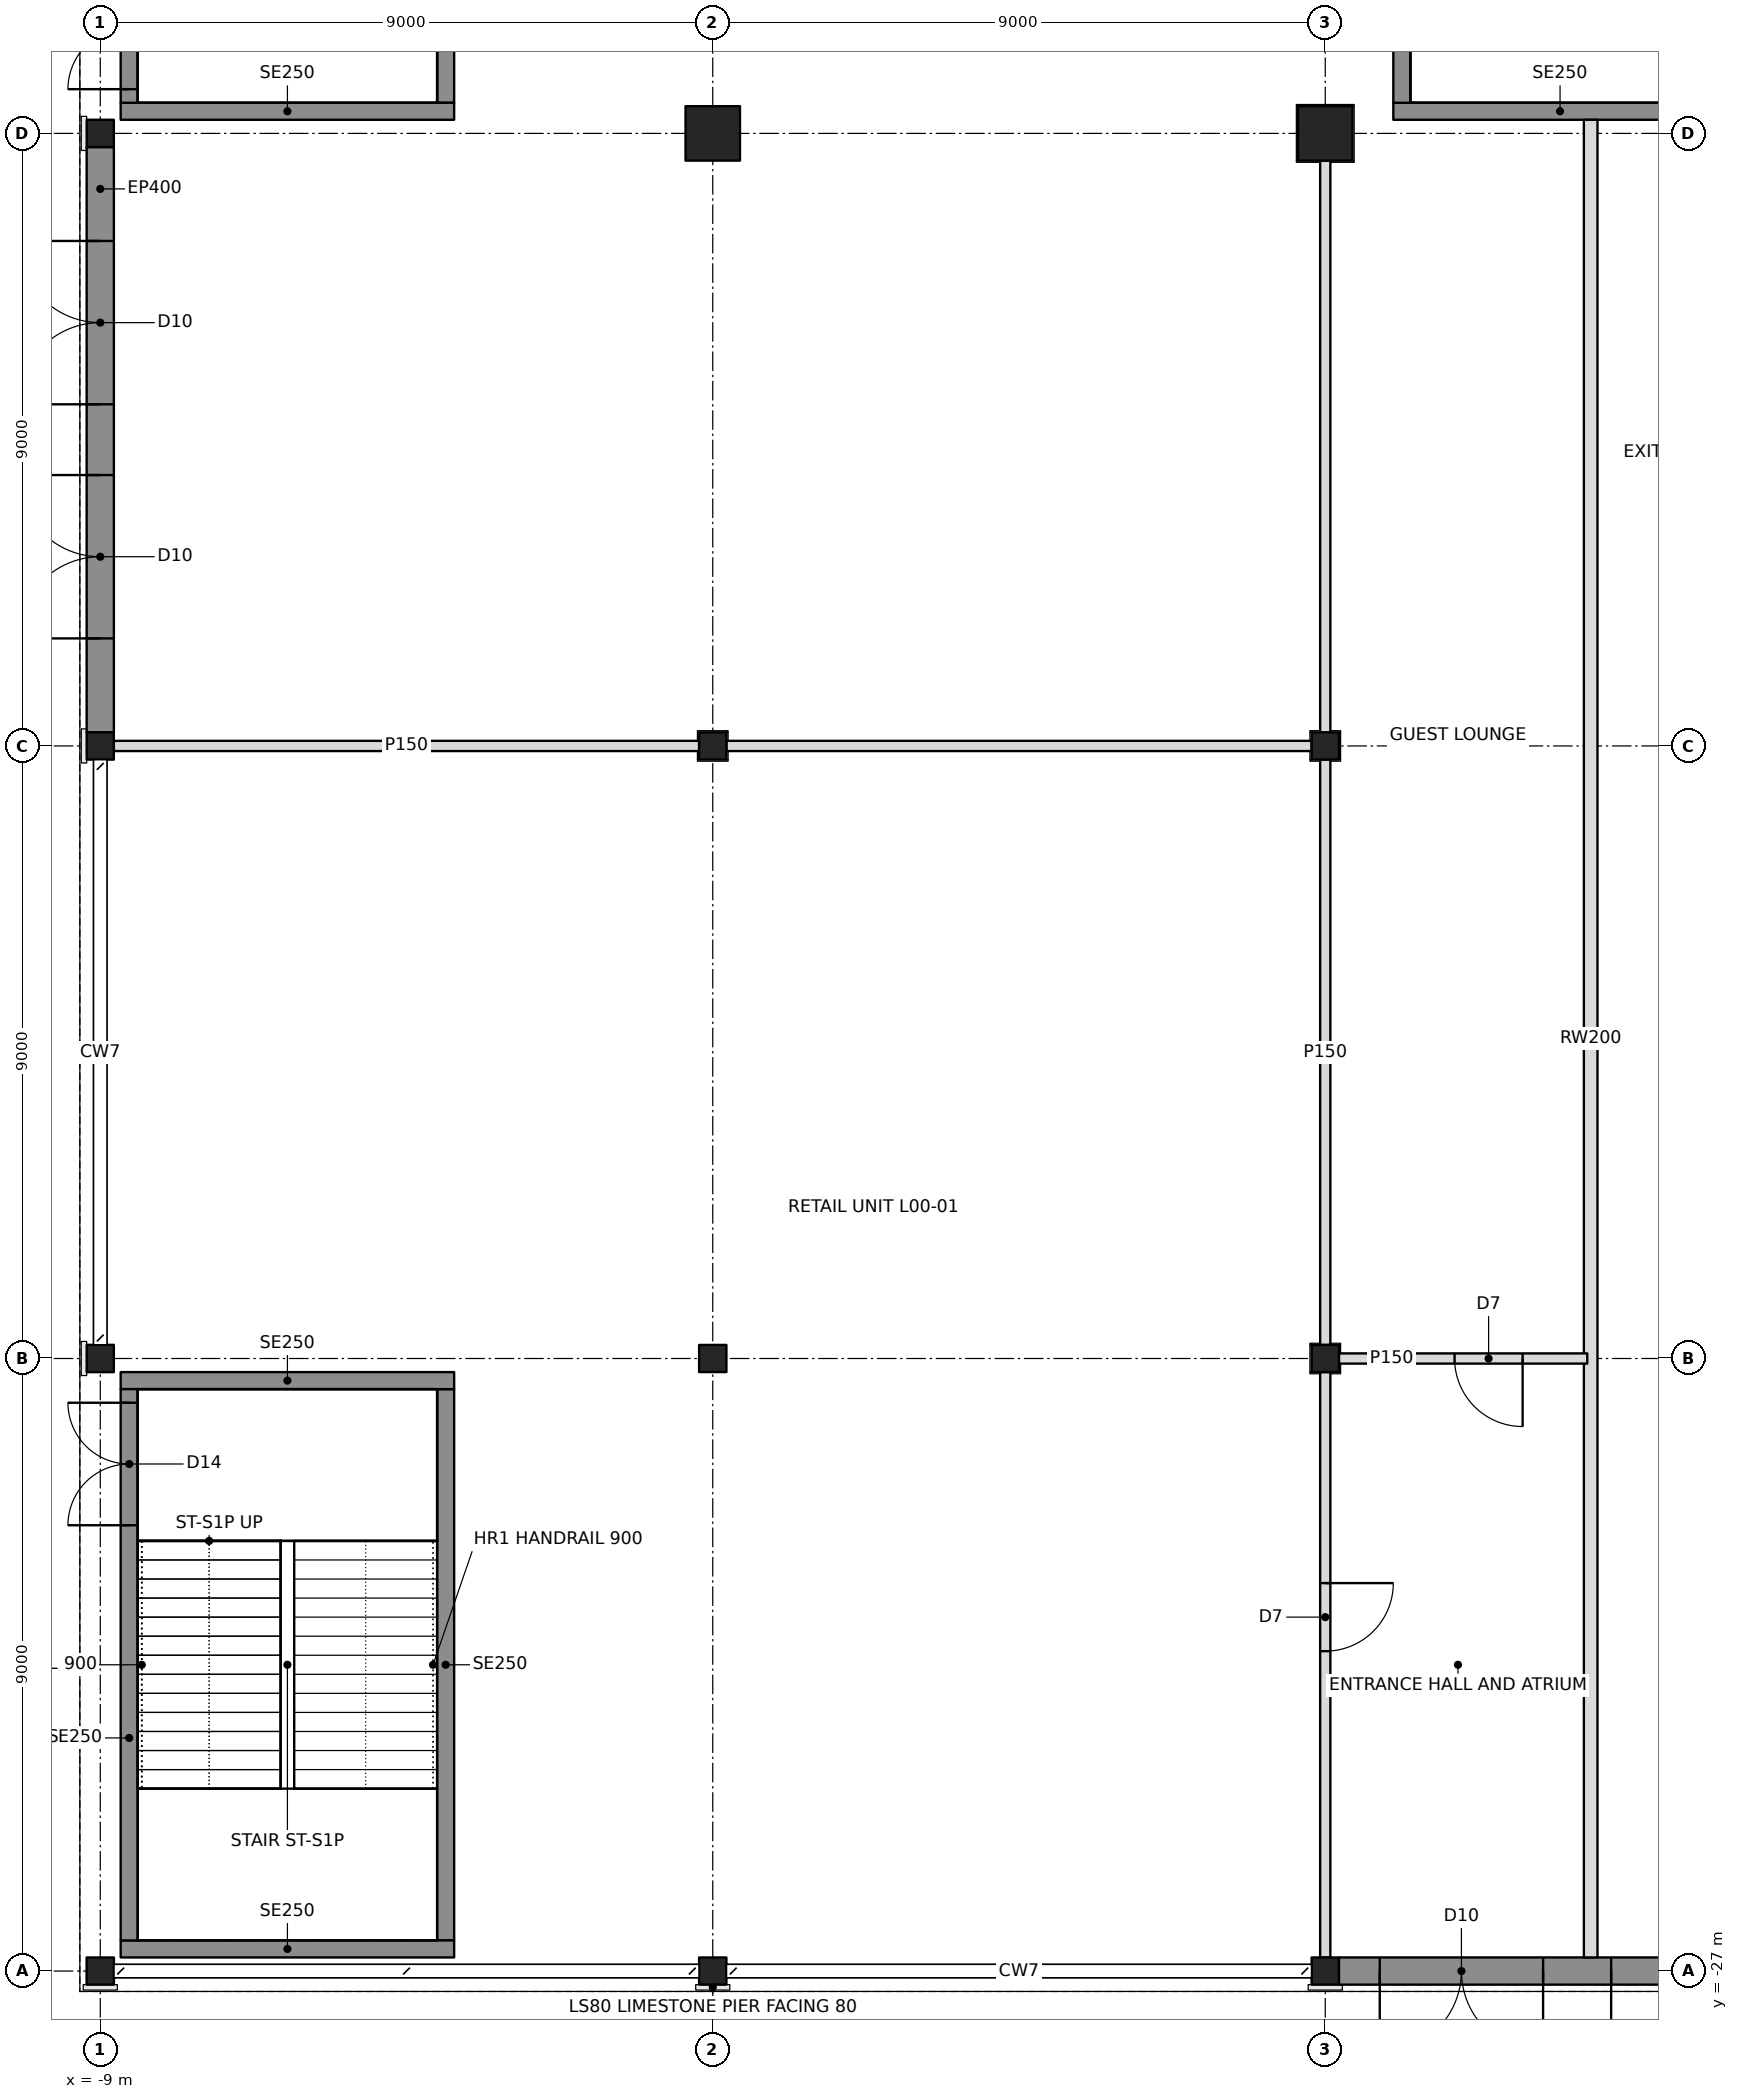
"""IFC4 building model, lengths in metres.
Left out: names, types, materials, properties, quantities, classifications, styles, units other than length and angle.
Written with IfcOpenShell. Run it as: python <this file> out.ifc"""

import sys

from ifc_helpers import new_model, si_unit, direction, frame, frame_2d, origin, origin_with_axes, origin_2d, place, context, subcontext, project, spatial, rectangle, hollow_rectangle, i_section, extrude, element, fill, save


model = new_model("IFC4")
c1 = context("Model", 3, precision=1e-05, world=origin(), true_north=direction((0.0, 1.0)))
c2 = subcontext(c1, "Body", "Model", "MODEL_VIEW")
j1 = project(units=[si_unit("LENGTHUNIT", "METRE"), si_unit("PLANEANGLEUNIT", "RADIAN")], contexts=[c1])
p1 = place(None, origin())
s1 = spatial("IfcSite", under=j1, at=p1, CompositionType="ELEMENT")
p2 = place(p1, origin())
s2 = spatial("IfcBuilding", under=s1, at=p2, CompositionType="ELEMENT")
p3 = place(p2, origin())
s3 = spatial("IfcBuildingStorey", under=s2, at=p3, CompositionType="ELEMENT", Elevation=0.0)
for number, where, z_axis, x_axis in (
    (1, (-9.0, -27.0, 0.0), (0.0, 0.0, 1.0), (1.0, 0.0, 0.0)),
    (2, (-9.0, -18.0, 0.0), (0.0, 0.0, 1.0), (0.0, 1.0, 0.0)),
    (3, (-9.0, -9.0, 0.0), (0.0, 0.0, 1.0), (0.0, 1.0, 0.0)),
    (4, (-9.0, 0.0, 0.0), (0.0, 0.0, 1.0), (0.0, 1.0, 0.0)),
    (5, (0.0, -27.0, 0.0), (0.0, 0.0, 1.0), (1.0, 0.0, 0.0)),
    (6, (0.0, -18.0, 0.0), (0.0, 0.0, 1.0), (1.0, 0.0, 0.0)),
    (7, (0.0, -9.0, 0.0), (0.0, 0.0, 1.0), (1.0, 0.0, 0.0)),
):
    element("IfcColumn", number, at=place(p3, frame(where, z_axis=z_axis, x_axis=x_axis)), inside=s3, PredefinedType="COLUMN", context=c2, shape_type="SweptSolid", body=[
        extrude(i_section(OverallWidth=0.401, OverallDepth=0.399, WebThickness=0.025, FlangeThickness=0.04, at=origin_2d()), origin(), (0.0, 0.0, 1.0), 6.0),
    ])
p4 = place(p3, origin_with_axes())
e8 = element("IfcColumn", 8, at=p4, inside=s3, PredefinedType="COLUMN", context=c2, shape_type="SweptSolid", body=[
    extrude(hollow_rectangle(XDim=0.8, YDim=0.8, WallThickness=0.1, at=origin_2d()), origin(), (0.0, 0.0, 1.0), 6.0),
])
for number, where, z_axis, x_axis in (
    (9, (9.0, -27.0, 0.0), (0.0, 0.0, 1.0), (1.0, 0.0, 0.0)),
    (10, (9.0, -18.0, 0.0), (0.0, 0.0, 1.0), (1.0, 0.0, 0.0)),
    (11, (9.0, -9.0, 0.0), (0.0, 0.0, 1.0), (1.0, 0.0, 0.0)),
):
    element("IfcColumn", number, at=place(p3, frame(where, z_axis=z_axis, x_axis=x_axis)), inside=s3, PredefinedType="COLUMN", context=c2, shape_type="SweptSolid", body=[
        extrude(i_section(OverallWidth=0.401, OverallDepth=0.399, WebThickness=0.025, FlangeThickness=0.04, at=origin_2d()), origin(), (0.0, 0.0, 1.0), 6.0),
    ])
p5 = place(p3, frame((9.0, 0.0, 0.0), z_axis=(0.0, 0.0, 1.0), x_axis=(1.0, 0.0, 0.0)))
e12 = element("IfcColumn", 12, at=p5, inside=s3, PredefinedType="COLUMN", context=c2, shape_type="SweptSolid", body=[
    extrude(hollow_rectangle(XDim=0.8, YDim=0.8, WallThickness=0.1, at=origin_2d()), origin(), (0.0, 0.0, 1.0), 6.0),
])
p6 = place(p3, frame((9.201, -27.0, 0.0), z_axis=(0.0, 0.0, 1.0), x_axis=(1.0, 0.0, 0.0)))
e13 = element("IfcWall", 13, at=p6, inside=s3, PredefinedType="SOLIDWALL", context=c2, shape_type="SweptSolid", body=[
    extrude(rectangle(XDim=8.599, YDim=0.4, at=frame_2d((4.299, 0.0))), origin(), (0.0, 0.0, 1.0), 5.054),
])
p7 = place(p6, frame((0.6, 0.0, 0.0)))
e14 = element("IfcOpeningElement", 14, at=p7, cuts=e13, PredefinedType="OPENING", context=c2, shape_type="SweptSolid", body=[
    extrude(rectangle(XDim=2.4, YDim=2.7, at=frame_2d((1.2, 1.35))), frame((0.0, 0.21, 0.0), z_axis=(0.0, -1.0, 0.0), x_axis=(1.0, 0.0, 0.0)), (0.0, 0.0, 1.0), 0.42),
])
p8 = place(p6, frame((4.0, 0.0, 0.0)))
e15 = element("IfcOpeningElement", 15, at=p8, cuts=e13, PredefinedType="OPENING", context=c2, shape_type="SweptSolid", body=[
    extrude(rectangle(XDim=2.4, YDim=2.7, at=frame_2d((1.2, 1.35))), frame((0.0, 0.21, 0.0), z_axis=(0.0, -1.0, 0.0), x_axis=(1.0, 0.0, 0.0)), (0.0, 0.0, 1.0), 0.42),
])
p9 = place(p6, frame((6.65, 0.0, 0.0)))
e16 = element("IfcOpeningElement", 16, at=p9, cuts=e13, PredefinedType="OPENING", context=c2, shape_type="SweptSolid", body=[
    extrude(rectangle(XDim=1.8, YDim=2.1, at=frame_2d((0.9, 1.05))), frame((0.0, 0.21, 0.0), z_axis=(0.0, -1.0, 0.0), x_axis=(1.0, 0.0, 0.0)), (0.0, 0.0, 1.0), 0.42),
])
p10 = place(p3, frame((-9.0, -0.201, 0.0), z_axis=(0.0, 0.0, 1.0), x_axis=(0.0, -1.0, 0.0)))
e17 = element("IfcWall", 17, at=p10, inside=s3, PredefinedType="SOLIDWALL", context=c2, shape_type="SweptSolid", body=[
    extrude(rectangle(XDim=8.599, YDim=0.4, at=frame_2d((4.299, 0.0))), origin(), (0.0, 0.0, 1.0), 5.054),
])
p11 = place(p10, frame((1.38, 0.0, 0.0)))
e18 = element("IfcOpeningElement", 18, at=p11, cuts=e17, PredefinedType="OPENING", context=c2, shape_type="SweptSolid", body=[
    extrude(rectangle(XDim=2.4, YDim=2.7, at=frame_2d((1.2, 1.35))), frame((0.0, 0.21, 0.0), z_axis=(0.0, -1.0, 0.0), x_axis=(1.0, 0.0, 0.0)), (0.0, 0.0, 1.0), 0.42),
])
p12 = place(p10, frame((4.819, 0.0, 0.0)))
e19 = element("IfcOpeningElement", 19, at=p12, cuts=e17, PredefinedType="OPENING", context=c2, shape_type="SweptSolid", body=[
    extrude(rectangle(XDim=2.4, YDim=2.7, at=frame_2d((1.2, 1.35))), frame((0.0, 0.21, 0.0), z_axis=(0.0, -1.0, 0.0), x_axis=(1.0, 0.0, 0.0)), (0.0, 0.0, 1.0), 0.42),
])
p13 = place(p3, frame((-8.801, -9.0, 0.0), z_axis=(0.0, 0.0, 1.0), x_axis=(1.0, 0.0, 0.0)))
e20 = element("IfcWall", 20, at=p13, inside=s3, PredefinedType="PARTITIONING", context=c2, shape_type="SweptSolid", body=[
    extrude(rectangle(XDim=8.6, YDim=0.15, at=frame_2d((4.3, 0.0))), origin(), (0.0, 0.0, 1.0), 4.892),
])
p14 = place(p3, frame((0.201, -9.0, 0.0), z_axis=(0.0, 0.0, 1.0), x_axis=(1.0, 0.0, 0.0)))
e21 = element("IfcWall", 21, at=p14, inside=s3, PredefinedType="PARTITIONING", context=c2, shape_type="SweptSolid", body=[
    extrude(rectangle(XDim=8.599, YDim=0.15, at=frame_2d((4.299, 0.0))), origin(), (0.0, 0.0, 1.0), 4.892),
])
p15 = place(p3, frame((9.0, -18.199, 0.0), z_axis=(0.0, 0.0, 1.0), x_axis=(0.0, -1.0, 0.0)))
e22 = element("IfcWall", 22, at=p15, inside=s3, PredefinedType="PARTITIONING", context=c2, shape_type="SweptSolid", body=[
    extrude(rectangle(XDim=8.601, YDim=0.15, at=frame_2d((4.301, 0.0))), origin(), (0.0, 0.0, 1.0), 4.892),
])
p16 = place(p15, frame((3.101, 0.0, 0.0)))
e23 = element("IfcOpeningElement", 23, at=p16, cuts=e22, PredefinedType="OPENING", context=c2, shape_type="SweptSolid", body=[
    extrude(rectangle(XDim=1.0, YDim=2.1, at=frame_2d((0.5, 1.05))), frame((0.0, 0.085, 0.0), z_axis=(0.0, -1.0, 0.0), x_axis=(1.0, 0.0, 0.0)), (0.0, 0.0, 1.0), 0.17),
])
p17 = place(p3, frame((12.85, -18.0, 0.0), z_axis=(0.0, 0.0, 1.0), x_axis=(-1.0, 0.0, 0.0)))
e24 = element("IfcWall", 24, at=p17, inside=s3, PredefinedType="PARTITIONING", context=c2, shape_type="SweptSolid", body=[
    extrude(rectangle(XDim=3.649, YDim=0.15, at=frame_2d((1.825, 0.0))), origin(), (0.0, 0.0, 1.0), 4.892),
])
p18 = place(p17, frame((0.95, 0.0, 0.0)))
e25 = element("IfcOpeningElement", 25, at=p18, cuts=e24, PredefinedType="OPENING", context=c2, shape_type="SweptSolid", body=[
    extrude(rectangle(XDim=1.0, YDim=2.1, at=frame_2d((0.5, 1.05))), frame((0.0, 0.085, 0.0), z_axis=(0.0, -1.0, 0.0), x_axis=(1.0, 0.0, 0.0)), (0.0, 0.0, 1.0), 0.17),
])
p19 = place(p3, frame((9.0, -9.199, 0.0), z_axis=(0.0, 0.0, 1.0), x_axis=(0.0, -1.0, 0.0)))
e26 = element("IfcWall", 26, at=p19, inside=s3, PredefinedType="PARTITIONING", context=c2, shape_type="SweptSolid", body=[
    extrude(rectangle(XDim=8.601, YDim=0.15, at=frame_2d((4.301, 0.0))), origin(), (0.0, 0.0, 1.0), 4.892),
])
p20 = place(p3, frame((9.0, -0.4, 0.0), z_axis=(0.0, 0.0, 1.0), x_axis=(0.0, -1.0, 0.0)))
e27 = element("IfcWall", 27, at=p20, inside=s3, PredefinedType="PARTITIONING", context=c2, shape_type="SweptSolid", body=[
    extrude(rectangle(XDim=8.401, YDim=0.15, at=frame_2d((4.2, 0.0))), origin(), (0.0, 0.0, 1.0), 4.892),
])
p21 = place(p3, frame((12.9, -26.8, 0.0), z_axis=(0.0, 0.0, 1.0), x_axis=(0.0, 1.0, 0.0)))
e28 = element("IfcWall", 28, at=p21, inside=s3, PredefinedType="PARTITIONING", context=c2, shape_type="SweptSolid", body=[
    extrude(rectangle(XDim=27.0, YDim=0.2, at=frame_2d((13.5, 0.0))), origin(), (0.0, 0.0, 1.0), 4.891),
])
for number, where, z_axis, x_axis in (
    (29, (-8.7, -26.675, 0.0), (0.0, 0.0, 1.0), (1.0, 0.0, 0.0)),
    (30, (-8.7, -18.325, 0.0), (0.0, 0.0, 1.0), (1.0, 0.0, 0.0)),
):
    element("IfcWall", number, at=place(p3, frame(where, z_axis=z_axis, x_axis=x_axis)), inside=s3, PredefinedType="SOLIDWALL", context=c2, shape_type="SweptSolid", body=[
        extrude(rectangle(XDim=4.9, YDim=0.25, at=frame_2d((2.45, 0.0))), origin(), (0.0, 0.0, 1.0), 5.75),
    ])
p22 = place(p3, frame((-8.575, -26.55, 0.0), z_axis=(0.0, 0.0, 1.0), x_axis=(0.0, 1.0, 0.0)))
e31 = element("IfcWall", 31, at=p22, inside=s3, PredefinedType="SOLIDWALL", context=c2, shape_type="SweptSolid", body=[
    extrude(rectangle(XDim=8.1, YDim=0.25, at=frame_2d((4.05, 0.0))), origin(), (0.0, 0.0, 1.0), 5.75),
])
p23 = place(p22, frame((6.1, 0.0, 0.0)))
e32 = element("IfcOpeningElement", 32, at=p23, cuts=e31, PredefinedType="OPENING", context=c2, shape_type="SweptSolid", body=[
    extrude(rectangle(XDim=1.8, YDim=2.1, at=frame_2d((0.9, 1.05))), frame((0.0, 0.135, 0.0), z_axis=(0.0, -1.0, 0.0), x_axis=(1.0, 0.0, 0.0)), (0.0, 0.0, 1.0), 0.27),
])
p24 = place(p3, frame((-3.925, -26.55, 0.0), z_axis=(0.0, 0.0, 1.0), x_axis=(0.0, 1.0, 0.0)))
e33 = element("IfcWall", 33, at=p24, inside=s3, PredefinedType="SOLIDWALL", context=c2, shape_type="SweptSolid", body=[
    extrude(rectangle(XDim=8.1, YDim=0.25, at=frame_2d((4.05, 0.0))), origin(), (0.0, 0.0, 1.0), 5.75),
])
p25 = place(p3, frame((-8.7, 0.325, 0.0), z_axis=(0.0, 0.0, 1.0), x_axis=(1.0, 0.0, 0.0)))
e34 = element("IfcWall", 34, at=p25, inside=s3, PredefinedType="SOLIDWALL", context=c2, shape_type="SweptSolid", body=[
    extrude(rectangle(XDim=4.9, YDim=0.25, at=frame_2d((2.45, 0.0))), origin(), (0.0, 0.0, 1.0), 5.75),
])
p26 = place(p3, frame((-8.575, 0.45, 0.0), z_axis=(0.0, 0.0, 1.0), x_axis=(0.0, 1.0, 0.0)))
e35 = element("IfcWall", 35, at=p26, inside=s3, PredefinedType="SOLIDWALL", context=c2, shape_type="SweptSolid", body=[
    extrude(rectangle(XDim=8.1, YDim=0.25, at=frame_2d((4.05, 0.0))), origin(), (0.0, 0.0, 1.0), 5.75),
])
p27 = place(p26, frame((0.2, 0.0, 0.0)))
e36 = element("IfcOpeningElement", 36, at=p27, cuts=e35, PredefinedType="OPENING", context=c2, shape_type="SweptSolid", body=[
    extrude(rectangle(XDim=1.8, YDim=2.1, at=frame_2d((0.9, 1.05))), frame((0.0, 0.135, 0.0), z_axis=(0.0, -1.0, 0.0), x_axis=(1.0, 0.0, 0.0)), (0.0, 0.0, 1.0), 0.27),
])
p28 = place(p3, frame((-3.925, 0.45, 0.0), z_axis=(0.0, 0.0, 1.0), x_axis=(0.0, 1.0, 0.0)))
e37 = element("IfcWall", 37, at=p28, inside=s3, PredefinedType="SOLIDWALL", context=c2, shape_type="SweptSolid", body=[
    extrude(rectangle(XDim=8.1, YDim=0.25, at=frame_2d((4.05, 0.0))), origin(), (0.0, 0.0, 1.0), 5.75),
])
p29 = place(p3, frame((10.0, 0.325, 0.0), z_axis=(0.0, 0.0, 1.0), x_axis=(1.0, 0.0, 0.0)))
e38 = element("IfcWall", 38, at=p29, inside=s3, PredefinedType="SOLIDWALL", context=c2, shape_type="SweptSolid", body=[
    extrude(rectangle(XDim=4.9, YDim=0.25, at=frame_2d((2.45, 0.0))), origin(), (0.0, 0.0, 1.0), 5.75),
])
p30 = place(p3, frame((10.125, 0.45, 0.0), z_axis=(0.0, 0.0, 1.0), x_axis=(0.0, 1.0, 0.0)))
e39 = element("IfcWall", 39, at=p30, inside=s3, PredefinedType="SOLIDWALL", context=c2, shape_type="SweptSolid", body=[
    extrude(rectangle(XDim=8.1, YDim=0.25, at=frame_2d((4.05, 0.0))), origin(), (0.0, 0.0, 1.0), 5.75),
])
p31 = place(p7, frame((2.4, 0.0, 0.0), z_axis=(0.0, 0.0, 1.0), x_axis=(-1.0, 0.0, 0.0)))
e40 = element("IfcDoor", 40, at=p31, inside=s3, OperationType="DOUBLE_DOOR_SINGLE_SWING", PredefinedType="DOOR", context=c2, shape_type="SweptSolid", body=[
    extrude(rectangle(XDim=2.4, YDim=2.7, at=frame_2d((1.2, 1.35))), frame((0.0, 0.025, 0.0), z_axis=(0.0, -1.0, 0.0), x_axis=(1.0, 0.0, 0.0)), (0.0, 0.0, 1.0), 0.05),
])
fill(e14, e40)
p32 = place(p8, frame((2.4, 0.0, 0.0), z_axis=(0.0, 0.0, 1.0), x_axis=(-1.0, 0.0, 0.0)))
e41 = element("IfcDoor", 41, at=p32, inside=s3, OperationType="DOUBLE_DOOR_SINGLE_SWING", PredefinedType="DOOR", context=c2, shape_type="SweptSolid", body=[
    extrude(rectangle(XDim=2.4, YDim=2.7, at=frame_2d((1.2, 1.35))), frame((0.0, 0.025, 0.0), z_axis=(0.0, -1.0, 0.0), x_axis=(1.0, 0.0, 0.0)), (0.0, 0.0, 1.0), 0.05),
])
fill(e15, e41)
p33 = place(p11, frame((2.4, 0.0, 0.0), z_axis=(0.0, 0.0, 1.0), x_axis=(-1.0, 0.0, 0.0)))
e42 = element("IfcDoor", 42, at=p33, inside=s3, OperationType="DOUBLE_DOOR_SINGLE_SWING", PredefinedType="DOOR", context=c2, shape_type="SweptSolid", body=[
    extrude(rectangle(XDim=2.4, YDim=2.7, at=frame_2d((1.2, 1.35))), frame((0.0, 0.025, 0.0), z_axis=(0.0, -1.0, 0.0), x_axis=(1.0, 0.0, 0.0)), (0.0, 0.0, 1.0), 0.05),
])
fill(e18, e42)
p34 = place(p12, frame((2.4, 0.0, 0.0), z_axis=(0.0, 0.0, 1.0), x_axis=(-1.0, 0.0, 0.0)))
e43 = element("IfcDoor", 43, at=p34, inside=s3, OperationType="DOUBLE_DOOR_SINGLE_SWING", PredefinedType="DOOR", context=c2, shape_type="SweptSolid", body=[
    extrude(rectangle(XDim=2.4, YDim=2.7, at=frame_2d((1.2, 1.35))), frame((0.0, 0.025, 0.0), z_axis=(0.0, -1.0, 0.0), x_axis=(1.0, 0.0, 0.0)), (0.0, 0.0, 1.0), 0.05),
])
fill(e19, e43)
p35 = place(p16, origin())
e44 = element("IfcDoor", 44, at=p35, inside=s3, OperationType="SINGLE_SWING_LEFT", PredefinedType="DOOR", context=c2, shape_type="SweptSolid", body=[
    extrude(rectangle(XDim=1.0, YDim=2.1, at=frame_2d((0.5, 1.05))), frame((0.0, 0.025, 0.0), z_axis=(0.0, -1.0, 0.0), x_axis=(1.0, 0.0, 0.0)), (0.0, 0.0, 1.0), 0.05),
])
fill(e23, e44)
p36 = place(p18, origin())
e45 = element("IfcDoor", 45, at=p36, inside=s3, OperationType="SINGLE_SWING_LEFT", PredefinedType="DOOR", context=c2, shape_type="SweptSolid", body=[
    extrude(rectangle(XDim=1.0, YDim=2.1, at=frame_2d((0.5, 1.05))), frame((0.0, 0.025, 0.0), z_axis=(0.0, -1.0, 0.0), x_axis=(1.0, 0.0, 0.0)), (0.0, 0.0, 1.0), 0.05),
])
fill(e25, e45)
p37 = place(p23, origin())
e46 = element("IfcDoor", 46, at=p37, inside=s3, OperationType="DOUBLE_DOOR_SINGLE_SWING", PredefinedType="DOOR", context=c2, shape_type="SweptSolid", body=[
    extrude(rectangle(XDim=1.8, YDim=2.1, at=frame_2d((0.9, 1.05))), frame((0.0, 0.025, 0.0), z_axis=(0.0, -1.0, 0.0), x_axis=(1.0, 0.0, 0.0)), (0.0, 0.0, 1.0), 0.05),
])
fill(e32, e46)
p38 = place(p27, origin())
e47 = element("IfcDoor", 47, at=p38, inside=s3, OperationType="DOUBLE_DOOR_SINGLE_SWING", PredefinedType="DOOR", context=c2, shape_type="SweptSolid", body=[
    extrude(rectangle(XDim=1.8, YDim=2.1, at=frame_2d((0.9, 1.05))), frame((0.0, 0.025, 0.0), z_axis=(0.0, -1.0, 0.0), x_axis=(1.0, 0.0, 0.0)), (0.0, 0.0, 1.0), 0.05),
])
fill(e36, e47)
save(model, sys.argv[1])
